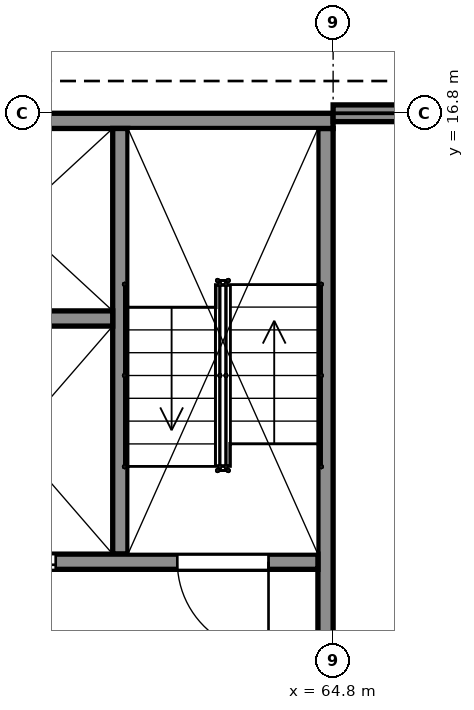
"""IFC4 building model, lengths in metres.
Left out: names, types, materials, properties, quantities, classifications, styles, units other than length and angle.
Written with IfcOpenShell. Run it as: python <this file> out.ifc"""

import sys

from ifc_helpers import new_model, si_unit, direction, frame, frame_2d, origin, place, context, subcontext, project, spatial, rectangle, extrude, element, fill, save


model = new_model("IFC4")
c1 = context("Model", 3, precision=1e-05, world=origin(), true_north=direction((0.0, 1.0)))
c2 = subcontext(c1, "Body", "Model", "MODEL_VIEW")
j1 = project(units=[si_unit("LENGTHUNIT", "METRE"), si_unit("PLANEANGLEUNIT", "RADIAN")], contexts=[c1])
p1 = place(None, origin())
s1 = spatial("IfcSite", under=j1, at=p1, CompositionType="ELEMENT")
p2 = place(p1, origin())
s2 = spatial("IfcBuilding", under=s1, at=p2, CompositionType="ELEMENT")
p3 = place(p2, frame((0.0, 0.0, 10.5)))
s3 = spatial("IfcBuildingStorey", under=s2, at=p3, CompositionType="ELEMENT", Elevation=10.5)
p4 = place(p3, frame((56.4, 16.7, 0.0), z_axis=(0.0, 0.0, 1.0), x_axis=(1.0, 0.0, 0.0)))
e1 = element("IfcWall", 1, at=p4, inside=s3, PredefinedType="SHEAR", context=c2, shape_type="SweptSolid", body=[
    extrude(rectangle(XDim=8.4, YDim=0.2, at=frame_2d((4.2, 0.0))), origin(), (0.0, 0.0, 1.0), 9.5),
])
p5 = place(p3, frame((64.7, 8.6, 0.0), z_axis=(0.0, 0.0, 1.0), x_axis=(0.0, 1.0, 0.0)))
e2 = element("IfcWall", 2, at=p5, inside=s3, PredefinedType="SHEAR", context=c2, shape_type="SweptSolid", body=[
    extrude(rectangle(XDim=8.0, YDim=0.2, at=frame_2d((4.0, 0.0))), origin(), (0.0, 0.0, 1.0), 9.5),
])
p6 = place(p3, frame((56.6, 10.9, 0.0), z_axis=(0.0, 0.0, 1.0), x_axis=(1.0, 0.0, 0.0)))
e3 = element("IfcWall", 3, at=p6, inside=s3, PredefinedType="SHEAR", context=c2, shape_type="SweptSolid", body=[
    extrude(rectangle(XDim=8.0, YDim=0.2, at=frame_2d((4.0, 0.0))), origin(), (0.0, 0.0, 1.0), 9.5),
])
p7 = place(p6, frame((0.65, 0.0, 0.0)))
e4 = element("IfcOpeningElement", 4, at=p7, cuts=e3, PredefinedType="OPENING", context=c2, shape_type="SweptSolid", body=[
    extrude(rectangle(XDim=1.2, YDim=2.1, at=frame_2d((0.6, 1.05))), frame((0.0, 0.11, 0.0), z_axis=(0.0, -1.0, 0.0), x_axis=(1.0, 0.0, 0.0)), (0.0, 0.0, 1.0), 0.22),
])
p8 = place(p6, frame((6.15, 0.0, 0.0)))
e5 = element("IfcOpeningElement", 5, at=p8, cuts=e3, PredefinedType="OPENING", context=c2, shape_type="SweptSolid", body=[
    extrude(rectangle(XDim=1.2, YDim=2.1, at=frame_2d((0.6, 1.05))), frame((0.0, 0.11, 0.0), z_axis=(0.0, -1.0, 0.0), x_axis=(1.0, 0.0, 0.0)), (0.0, 0.0, 1.0), 0.22),
])
p9 = place(p6, frame((3.45, 0.0, 0.0)))
e6 = element("IfcOpeningElement", 6, at=p9, cuts=e3, PredefinedType="OPENING", context=c2, shape_type="SweptSolid", body=[
    extrude(rectangle(XDim=1.1, YDim=2.1, at=frame_2d((0.55, 1.05))), frame((0.0, 0.11, 0.0), z_axis=(0.0, -1.0, 0.0), x_axis=(1.0, 0.0, 0.0)), (0.0, 0.0, 1.0), 0.22),
])
p10 = place(p3, frame((62.0, 11.0, 0.0), z_axis=(0.0, 0.0, 1.0), x_axis=(0.0, 1.0, 0.0)))
e7 = element("IfcWall", 7, at=p10, inside=s3, PredefinedType="SHEAR", context=c2, shape_type="SweptSolid", body=[
    extrude(rectangle(XDim=5.6, YDim=0.2, at=frame_2d((2.8, 0.0))), origin(), (0.0, 0.0, 1.0), 9.5),
])
p11 = place(p3, frame((59.3, 14.1, 0.0), z_axis=(0.0, 0.0, 1.0), x_axis=(1.0, 0.0, 0.0)))
e8 = element("IfcWall", 8, at=p11, inside=s3, PredefinedType="SHEAR", context=c2, shape_type="SweptSolid", body=[
    extrude(rectangle(XDim=2.6, YDim=0.2, at=frame_2d((1.3, 0.0))), origin(), (0.0, 0.0, 1.0), 9.5),
])
p12 = place(p3, frame((64.8, 16.8, 0.0), z_axis=(0.0, 0.0, 1.0), x_axis=(1.0, 0.0, 0.0)))
e9 = element("IfcWall", 9, at=p12, inside=s3, PredefinedType="SOLIDWALL", context=c2, shape_type="SweptSolid", body=[
    extrude(rectangle(XDim=8.05, YDim=0.22, at=frame_2d((4.025, 0.0))), origin(), (0.0, 0.0, 1.0), 8.44),
])
p13 = place(p12, frame((2.225, 0.0, 0.9)))
e10 = element("IfcOpeningElement", 10, at=p13, cuts=e9, PredefinedType="OPENING", context=c2, shape_type="SweptSolid", body=[
    extrude(rectangle(XDim=3.6, YDim=1.5, at=frame_2d((1.8, 0.75))), frame((0.0, 0.12, 0.0), z_axis=(0.0, -1.0, 0.0), x_axis=(1.0, 0.0, 0.0)), (0.0, 0.0, 1.0), 0.24),
])
p14 = place(p8, origin())
e11 = element("IfcDoor", 11, at=p14, inside=s3, OperationType="SINGLE_SWING_RIGHT", PredefinedType="DOOR", context=c2, shape_type="SweptSolid", body=[
    extrude(rectangle(XDim=1.2, YDim=2.1, at=frame_2d((0.6, 1.05))), frame((0.0, 0.025, 0.0), z_axis=(0.0, -1.0, 0.0), x_axis=(1.0, 0.0, 0.0)), (0.0, 0.0, 1.0), 0.05),
])
fill(e5, e11)
p15 = place(p9, origin())
e12 = element("IfcDoor", 12, at=p15, inside=s3, OperationType="DOUBLE_DOOR_SLIDING", PredefinedType="DOOR", context=c2, shape_type="SweptSolid", body=[
    extrude(rectangle(XDim=1.1, YDim=2.1, at=frame_2d((0.55, 1.05))), frame((0.0, 0.025, 0.0), z_axis=(0.0, -1.0, 0.0), x_axis=(1.0, 0.0, 0.0)), (0.0, 0.0, 1.0), 0.05),
])
fill(e6, e12)
save(model, sys.argv[1])
